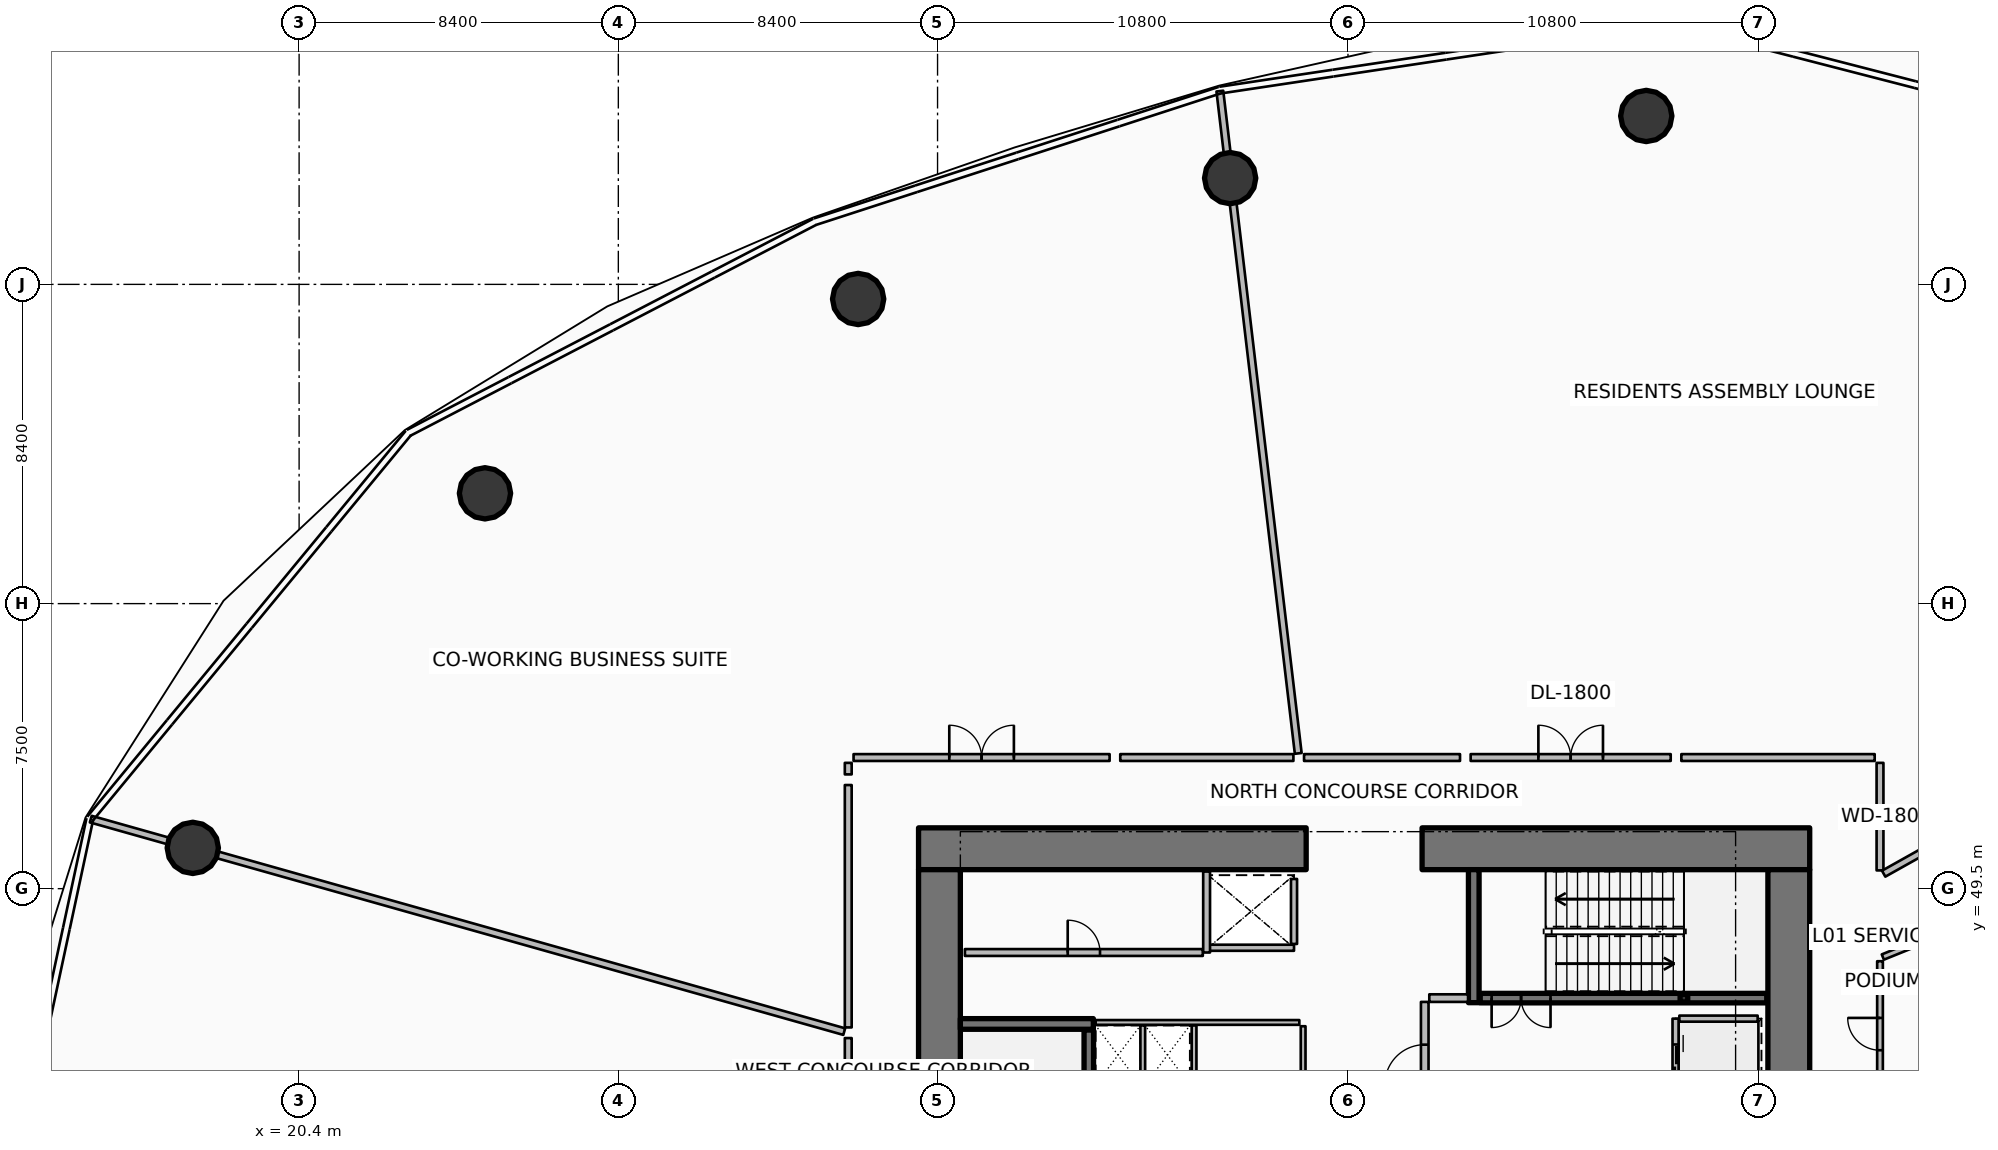
"""IFC4 building model, lengths in metres.
Left out: names, types, materials, properties, quantities, classifications, styles, units other than length and angle.
Written with IfcOpenShell. Run it as: python <this file> out.ifc"""

import sys

from ifc_helpers import new_model, si_unit, direction, frame, frame_2d, origin, origin_2d, place, context, subcontext, project, spatial, rectangle, hollow_rectangle, circle, extrude, element, fill, save


model = new_model("IFC4")
c1 = context("Model", 3, precision=1e-05, world=origin(), true_north=direction((0.0, 1.0)))
c2 = subcontext(c1, "Body", "Model", "MODEL_VIEW")
j1 = project(units=[si_unit("LENGTHUNIT", "METRE"), si_unit("PLANEANGLEUNIT", "RADIAN")], contexts=[c1])
p1 = place(None, origin())
s1 = spatial("IfcSite", under=j1, at=p1, CompositionType="ELEMENT")
p2 = place(p1, origin())
s2 = spatial("IfcBuilding", under=s1, at=p2, CompositionType="ELEMENT")
p3 = place(p2, frame((0.0, 0.0, 7.2)))
s3 = spatial("IfcBuildingStorey", under=s2, at=p3, CompositionType="ELEMENT", Elevation=7.2)
for number, where, z_axis, x_axis in (
    (1, (36.7, 50.55, 0.0), (0.0, 0.0, 1.0), (1.0, 0.0, 0.0)),
    (2, (49.95, 50.55, 0.0), (0.0, 0.0, 1.0), (1.0, 0.0, 0.0)),
):
    element("IfcWall", number, at=place(p3, frame(where, z_axis=z_axis, x_axis=x_axis)), inside=s3, PredefinedType="SHEAR", context=c2, shape_type="SweptSolid", body=[
        extrude(rectangle(XDim=10.2, YDim=1.1, at=frame_2d((5.1, 0.0))), origin(), (0.0, 0.0, 1.0), 4.8),
    ])
for number, where, z_axis, x_axis in (
    (3, (37.25, 34.0, 0.0), (0.0, 0.0, 1.0), (0.0, 1.0, 0.0)),
    (4, (59.6, 34.0, 0.0), (0.0, 0.0, 1.0), (0.0, 1.0, 0.0)),
):
    element("IfcWall", number, at=place(p3, frame(where, z_axis=z_axis, x_axis=x_axis)), inside=s3, PredefinedType="SHEAR", context=c2, shape_type="SweptSolid", body=[
        extrude(rectangle(XDim=16.0, YDim=1.1, at=frame_2d((8.0, 0.0))), origin(), (0.0, 0.0, 1.0), 4.8),
    ])
for number, where, z_axis, x_axis in (
    (5, (37.8, 45.94, 0.0), (0.0, 0.0, 1.0), (1.0, 0.0, 0.0)),
    (6, (51.31, 46.5, 0.0), (0.0, 0.0, 1.0), (0.0, 1.0, 0.0)),
):
    element("IfcWall", number, at=place(p3, frame(where, z_axis=z_axis, x_axis=x_axis)), inside=s3, PredefinedType="SHEAR", context=c2, shape_type="SweptSolid", body=[
        extrude(rectangle(XDim=3.5, YDim=0.28, at=frame_2d((1.75, 0.0))), origin(), (0.0, 0.0, 1.0), 4.8),
    ])
p4 = place(p3, frame((56.84, 46.62, 0.0), z_axis=(0.0, 0.0, 1.0), x_axis=(1.0, 0.0, 0.0)))
e7 = element("IfcColumn", 7, at=p4, inside=s3, PredefinedType="COLUMN", context=c2, shape_type="SweptSolid", body=[
    extrude(hollow_rectangle(XDim=0.2, YDim=0.2, WallThickness=0.01, InnerFilletRadius=0.01, OuterFilletRadius=0.02, at=origin_2d()), origin(), (0.0, 0.0, 1.0), 2.195),
])
for number, where, z_axis, x_axis in (
    (8, (55.849, 69.831, 0.0), (0.0, 0.0, 1.0), (1.0, 0.0, 0.0)),
    (9, (44.899, 68.196, 0.0), (0.0, 0.0, 1.0), (1.0, 0.0, 0.0)),
    (10, (35.111, 65.016, 0.0), (0.0, 0.0, 1.0), (1.0, 0.0, 0.0)),
    (11, (25.291, 59.902, 0.0), (0.0, 0.0, 1.0), (1.0, 0.0, 0.0)),
    (12, (17.602, 50.573, 0.0), (0.0, 0.0, 1.0), (1.0, 0.0, 0.0)),
):
    element("IfcColumn", number, at=place(p3, frame(where, z_axis=z_axis, x_axis=x_axis)), inside=s3, PredefinedType="COLUMN", context=c2, shape_type="SweptSolid", body=[
        extrude(circle(Radius=0.675, at=origin_2d()), origin(), (0.0, 0.0, 1.0), 4.48),
    ])
p5 = place(p3, frame((41.18, 38.22, 0.0), z_axis=(0.0, 0.0, 1.0), x_axis=(0.0, 1.0, 0.0)))
e13 = element("IfcWall", 13, at=p5, inside=s3, PredefinedType="SOLIDWALL", context=c2, shape_type="SweptSolid", body=[
    extrude(rectangle(XDim=7.56, YDim=0.25, at=frame_2d((3.78, 0.0))), origin(), (0.0, 0.0, 1.0), 4.48),
])
p6 = place(p5, frame((0.3, 0.0, 0.0)))
e14 = element("IfcOpeningElement", 14, at=p6, cuts=e13, PredefinedType="OPENING", context=c2, shape_type="SweptSolid", body=[
    extrude(rectangle(XDim=1.55, YDim=2.15, at=frame_2d((0.775, 1.075))), frame((0.0, 0.135, 0.0), z_axis=(0.0, -1.0, 0.0), x_axis=(1.0, 0.0, 0.0)), (0.0, 0.0, 1.0), 0.27),
])
p7 = place(p3, frame((51.48, 46.62, 0.0), z_axis=(0.0, 0.0, 1.0), x_axis=(1.0, 0.0, 0.0)))
e15 = element("IfcWall", 15, at=p7, inside=s3, PredefinedType="SOLIDWALL", context=c2, shape_type="SweptSolid", body=[
    extrude(rectangle(XDim=7.54, YDim=0.25, at=frame_2d((3.77, 0.0))), origin(), (0.0, 0.0, 1.0), 4.48),
])
p8 = place(p7, frame((0.3, 0.0, 0.0)))
e16 = element("IfcOpeningElement", 16, at=p8, cuts=e15, PredefinedType="OPENING", context=c2, shape_type="SweptSolid", body=[
    extrude(rectangle(XDim=1.55, YDim=2.15, at=frame_2d((0.775, 1.075))), frame((0.0, 0.135, 0.0), z_axis=(0.0, -1.0, 0.0), x_axis=(1.0, 0.0, 0.0)), (0.0, 0.0, 1.0), 0.27),
])
p9 = place(p3, frame((46.58, 47.945, 0.0), z_axis=(0.0, 0.0, 1.0), x_axis=(-1.0, 0.0, 0.0)))
e17 = element("IfcWall", 17, at=p9, inside=s3, PredefinedType="PARTITIONING", context=c2, shape_type="SweptSolid", body=[
    extrude(rectangle(XDim=2.26, YDim=0.16, at=frame_2d((1.13, 0.0))), origin(), (0.0, 0.0, 1.0), 4.48),
])
p10 = place(p3, frame((46.58, 48.045, 0.0), z_axis=(0.0, 0.0, 1.0), x_axis=(0.0, 1.0, 0.0)))
e18 = element("IfcWall", 18, at=p10, inside=s3, PredefinedType="PARTITIONING", context=c2, shape_type="SweptSolid", body=[
    extrude(rectangle(XDim=1.71, YDim=0.16, at=frame_2d((0.855, 0.0))), origin(), (0.0, 0.0, 1.0), 4.48),
])
p11 = place(p3, frame((56.62, 46.08, 0.0), z_axis=(0.0, 0.0, 1.0), x_axis=(0.0, -1.0, 0.0)))
e19 = element("IfcWall", 19, at=p11, inside=s3, PredefinedType="PARTITIONING", context=c2, shape_type="SweptSolid", body=[
    extrude(rectangle(XDim=2.46, YDim=0.16, at=frame_2d((1.23, 0.0))), origin(), (0.0, 0.0, 1.0), 4.48),
])
p12 = place(p11, frame((0.68, 0.0, 0.0)))
e20 = element("IfcOpeningElement", 20, at=p12, cuts=e19, PredefinedType="OPENING", context=c2, shape_type="SweptSolid", body=[
    extrude(rectangle(XDim=1.1, YDim=2.1, at=frame_2d((0.55, 1.05))), frame((0.0, 0.09, 0.0), z_axis=(0.0, -1.0, 0.0), x_axis=(1.0, 0.0, 0.0)), (0.0, 0.0, 1.0), 0.18),
])
p13 = place(p3, frame((56.72, 46.08, 0.0), z_axis=(0.0, 0.0, 1.0), x_axis=(1.0, 0.0, 0.0)))
e21 = element("IfcWall", 21, at=p13, inside=s3, PredefinedType="PARTITIONING", context=c2, shape_type="SweptSolid", body=[
    extrude(rectangle(XDim=2.06, YDim=0.16, at=frame_2d((1.03, 0.0))), origin(), (0.0, 0.0, 1.0), 4.48),
])
p14 = place(p3, frame((37.92, 47.82, 0.0), z_axis=(0.0, 0.0, 1.0), x_axis=(1.0, 0.0, 0.0)))
e22 = element("IfcWall", 22, at=p14, inside=s3, PredefinedType="PARTITIONING", context=c2, shape_type="SweptSolid", body=[
    extrude(rectangle(XDim=6.26, YDim=0.18, at=frame_2d((3.13, 0.0))), origin(), (0.0, 0.0, 1.0), 4.48),
])
p15 = place(p14, frame((2.705, 0.0, 0.0)))
e23 = element("IfcOpeningElement", 23, at=p15, cuts=e22, PredefinedType="OPENING", context=c2, shape_type="SweptSolid", body=[
    extrude(rectangle(XDim=0.85, YDim=2.06, at=frame_2d((0.425, 1.03))), frame((0.0, 0.1, 0.0), z_axis=(0.0, -1.0, 0.0), x_axis=(1.0, 0.0, 0.0)), (0.0, 0.0, 1.0), 0.2),
])
p16 = place(p3, frame((44.28, 47.82, 0.0), z_axis=(0.0, 0.0, 1.0), x_axis=(0.0, 1.0, 0.0)))
e24 = element("IfcWall", 24, at=p16, inside=s3, PredefinedType="PARTITIONING", context=c2, shape_type="SweptSolid", body=[
    extrude(rectangle(XDim=2.13, YDim=0.18, at=frame_2d((1.065, 0.0))), origin(), (0.0, 0.0, 1.0), 4.48),
])
p17 = place(p3, frame((50.14, 46.62, 0.0), z_axis=(0.0, 0.0, 1.0), x_axis=(1.0, 0.0, 0.0)))
e25 = element("IfcWall", 25, at=p17, inside=s3, PredefinedType="PARTITIONING", context=c2, shape_type="SweptSolid", body=[
    extrude(rectangle(XDim=1.02, YDim=0.2, at=frame_2d((0.51, 0.0))), origin(), (0.0, 0.0, 1.0), 4.48),
])
p18 = place(p3, frame((50.02, 43.22, 0.0), z_axis=(0.0, 0.0, 1.0), x_axis=(0.0, 1.0, 0.0)))
e26 = element("IfcWall", 26, at=p18, inside=s3, PredefinedType="PARTITIONING", context=c2, shape_type="SweptSolid", body=[
    extrude(rectangle(XDim=3.3, YDim=0.2, at=frame_2d((1.65, 0.0))), origin(), (0.0, 0.0, 1.0), 4.48),
])
p19 = place(p18, frame((1.125, 0.0, 0.0)))
e27 = element("IfcOpeningElement", 27, at=p19, cuts=e26, PredefinedType="OPENING", context=c2, shape_type="SweptSolid", body=[
    extrude(rectangle(XDim=1.05, YDim=2.1, at=frame_2d((0.525, 1.05))), frame((0.0, 0.11, 0.0), z_axis=(0.0, -1.0, 0.0), x_axis=(1.0, 0.0, 0.0)), (0.0, 0.0, 1.0), 0.22),
])
p20 = place(p3, frame((41.36, 45.98, 0.0), z_axis=(0.0, 0.0, 1.0), x_axis=(1.0, 0.0, 0.0)))
e28 = element("IfcWall", 28, at=p20, inside=s3, PredefinedType="PARTITIONING", context=c2, shape_type="SweptSolid", body=[
    extrude(rectangle(XDim=5.36, YDim=0.125, at=frame_2d((2.68, 0.0))), origin(), (0.0, 0.0, 1.0), 3.92),
])
p21 = place(p3, frame((42.6, 44.35, 0.0), z_axis=(0.0, 0.0, 1.0), x_axis=(0.0, 1.0, 0.0)))
e29 = element("IfcWall", 29, at=p21, inside=s3, PredefinedType="PARTITIONING", context=c2, shape_type="SweptSolid", body=[
    extrude(rectangle(XDim=1.55, YDim=0.125, at=frame_2d((0.775, 0.0))), origin(), (0.0, 0.0, 1.0), 3.92),
])
p22 = place(p3, frame((43.95, 41.58, 0.0), z_axis=(0.0, 0.0, 1.0), x_axis=(0.0, 1.0, 0.0)))
e30 = element("IfcWall", 30, at=p22, inside=s3, PredefinedType="PARTITIONING", context=c2, shape_type="SweptSolid", body=[
    extrude(rectangle(XDim=4.32, YDim=0.125, at=frame_2d((2.16, 0.0))), origin(), (0.0, 0.0, 1.0), 3.92),
])
p23 = place(p3, frame((46.82, 41.58, 0.0), z_axis=(0.0, 0.0, 1.0), x_axis=(0.0, 1.0, 0.0)))
e31 = element("IfcWall", 31, at=p23, inside=s3, PredefinedType="PARTITIONING", context=c2, shape_type="SweptSolid", body=[
    extrude(rectangle(XDim=4.3, YDim=0.125, at=frame_2d((2.15, 0.0))), origin(), (0.0, 0.0, 1.0), 3.92),
])
p24 = place(p23, frame((1.725, 0.0, 0.0)))
e32 = element("IfcOpeningElement", 32, at=p24, cuts=e31, PredefinedType="OPENING", context=c2, shape_type="SweptSolid", body=[
    extrude(rectangle(XDim=0.85, YDim=2.06, at=frame_2d((0.425, 1.03))), frame((0.0, 0.073, 0.0), z_axis=(0.0, -1.0, 0.0), x_axis=(1.0, 0.0, 0.0)), (0.0, 0.0, 1.0), 0.145),
])
p25 = place(p3, frame((62.0, 49.98, 0.0), z_axis=(0.0, 0.0, 1.0), x_axis=(0.0, 1.0, 0.0)))
e33 = element("IfcWall", 33, at=p25, inside=s3, PredefinedType="PARTITIONING", context=c2, shape_type="SweptSolid", body=[
    extrude(rectangle(XDim=2.83, YDim=0.18, at=frame_2d((1.415, 0.0))), origin(), (0.0, 0.0, 1.0), 3.693),
])
p26 = place(p3, frame((61.86, 52.95, 0.0), z_axis=(0.0, 0.0, 1.0), x_axis=(-1.0, 0.0, 0.0)))
e34 = element("IfcWall", 34, at=p26, inside=s3, PredefinedType="PARTITIONING", context=c2, shape_type="SweptSolid", body=[
    extrude(rectangle(XDim=5.088, YDim=0.18, at=frame_2d((2.544, 0.0))), origin(), (0.0, 0.0, 1.0), 3.693),
])
p27 = place(p3, frame((56.492, 52.95, 0.0), z_axis=(0.0, 0.0, 1.0), x_axis=(-1.0, 0.0, 0.0)))
e35 = element("IfcWall", 35, at=p27, inside=s3, PredefinedType="PARTITIONING", context=c2, shape_type="SweptSolid", body=[
    extrude(rectangle(XDim=5.264, YDim=0.18, at=frame_2d((2.632, 0.0))), origin(), (0.0, 0.0, 1.0), 3.693),
])
p28 = place(p27, frame((1.782, 0.0, 0.0)))
e36 = element("IfcOpeningElement", 36, at=p28, cuts=e35, PredefinedType="OPENING", context=c2, shape_type="SweptSolid", body=[
    extrude(rectangle(XDim=1.7, YDim=2.15, at=frame_2d((0.85, 1.075))), frame((0.0, 0.1, 0.0), z_axis=(0.0, -1.0, 0.0), x_axis=(1.0, 0.0, 0.0)), (0.0, 0.0, 1.0), 0.2),
])
p29 = place(p3, frame((50.948, 52.95, 0.0), z_axis=(0.0, 0.0, 1.0), x_axis=(-1.0, 0.0, 0.0)))
e37 = element("IfcWall", 37, at=p29, inside=s3, PredefinedType="PARTITIONING", context=c2, shape_type="SweptSolid", body=[
    extrude(rectangle(XDim=4.104, YDim=0.18, at=frame_2d((2.052, 0.0))), origin(), (0.0, 0.0, 1.0), 3.693),
])
p30 = place(p3, frame((62.096, 49.894, 0.0), z_axis=(0.0, 0.0, 1.0), x_axis=(0.872490608205, 0.488630881744, 0.0)))
e38 = element("IfcWall", 38, at=p30, inside=s3, PredefinedType="PARTITIONING", context=c2, shape_type="SweptSolid", body=[
    extrude(rectangle(XDim=19.185, YDim=0.18, at=frame_2d((9.592, 0.0))), origin(), (0.0, 0.0, 1.0), 3.693),
])
p31 = place(p3, frame((46.691, 53.059, 0.0), z_axis=(0.0, 0.0, 1.0), x_axis=(-0.117547531601, 0.993067257448, 0.0)))
e39 = element("IfcWall", 39, at=p31, inside=s3, PredefinedType="PARTITIONING", context=c2, shape_type="SweptSolid", body=[
    extrude(rectangle(XDim=17.548, YDim=0.18, at=frame_2d((8.774, 0.0))), origin(), (0.0, 0.0, 1.0), 3.693),
])
p32 = place(p3, frame((46.564, 52.95, 0.0), z_axis=(0.0, 0.0, 1.0), x_axis=(-1.0, 0.0, 0.0)))
e40 = element("IfcWall", 40, at=p32, inside=s3, PredefinedType="PARTITIONING", context=c2, shape_type="SweptSolid", body=[
    extrude(rectangle(XDim=4.556, YDim=0.18, at=frame_2d((2.278, 0.0))), origin(), (0.0, 0.0, 1.0), 3.693),
])
p33 = place(p3, frame((41.728, 52.95, 0.0), z_axis=(0.0, 0.0, 1.0), x_axis=(-1.0, 0.0, 0.0)))
e41 = element("IfcWall", 41, at=p33, inside=s3, PredefinedType="PARTITIONING", context=c2, shape_type="SweptSolid", body=[
    extrude(rectangle(XDim=6.738, YDim=0.18, at=frame_2d((3.369, 0.0))), origin(), (0.0, 0.0, 1.0), 3.693),
])
p34 = place(p33, frame((2.519, 0.0, 0.0)))
e42 = element("IfcOpeningElement", 42, at=p34, cuts=e41, PredefinedType="OPENING", context=c2, shape_type="SweptSolid", body=[
    extrude(rectangle(XDim=1.7, YDim=2.15, at=frame_2d((0.85, 1.075))), frame((0.0, 0.1, 0.0), z_axis=(0.0, -1.0, 0.0), x_axis=(1.0, 0.0, 0.0)), (0.0, 0.0, 1.0), 0.2),
])
p35 = place(p3, frame((34.85, 52.81, 0.0), z_axis=(0.0, 0.0, 1.0), x_axis=(0.0, -1.0, 0.0)))
e43 = element("IfcWall", 43, at=p35, inside=s3, PredefinedType="PARTITIONING", context=c2, shape_type="SweptSolid", body=[
    extrude(rectangle(XDim=0.303, YDim=0.18, at=frame_2d((0.152, 0.0))), origin(), (0.0, 0.0, 1.0), 3.693),
])
p36 = place(p3, frame((34.85, 52.227, 0.0), z_axis=(0.0, 0.0, 1.0), x_axis=(0.0, -1.0, 0.0)))
e44 = element("IfcWall", 44, at=p36, inside=s3, PredefinedType="PARTITIONING", context=c2, shape_type="SweptSolid", body=[
    extrude(rectangle(XDim=6.378, YDim=0.18, at=frame_2d((3.189, 0.0))), origin(), (0.0, 0.0, 1.0), 3.693),
])
p37 = place(p3, frame((34.744, 45.739, 0.0), z_axis=(0.0, 0.0, 1.0), x_axis=(-0.96245531293, 0.271440178702, 0.0)))
e45 = element("IfcWall", 45, at=p37, inside=s3, PredefinedType="PARTITIONING", context=c2, shape_type="SweptSolid", body=[
    extrude(rectangle(XDim=20.6, YDim=0.18, at=frame_2d((10.3, 0.0))), origin(), (0.0, 0.0, 1.0), 3.693),
])
p38 = place(p3, frame((34.85, 45.569, 0.0), z_axis=(0.0, 0.0, 1.0), x_axis=(0.0, -1.0, 0.0)))
e46 = element("IfcWall", 46, at=p38, inside=s3, PredefinedType="PARTITIONING", context=c2, shape_type="SweptSolid", body=[
    extrude(rectangle(XDim=4.985, YDim=0.18, at=frame_2d((2.493, 0.0))), origin(), (0.0, 0.0, 1.0), 3.693),
])
p39 = place(p3, frame((62.109, 43.67, 0.0), z_axis=(0.0, 0.0, 1.0), x_axis=(0.993068665713, 0.117535633659, 0.0)))
e47 = element("IfcWall", 47, at=p39, inside=s3, PredefinedType="PARTITIONING", context=c2, shape_type="SweptSolid", body=[
    extrude(rectangle(XDim=21.133, YDim=0.18, at=frame_2d((10.566, 0.0))), origin(), (0.0, 0.0, 1.0), 3.693),
])
p40 = place(p3, frame((62.0, 43.757, 0.0), z_axis=(0.0, 0.0, 1.0), x_axis=(0.0, 1.0, 0.0)))
e48 = element("IfcWall", 48, at=p40, inside=s3, PredefinedType="PARTITIONING", context=c2, shape_type="SweptSolid", body=[
    extrude(rectangle(XDim=3.833, YDim=0.15, at=frame_2d((1.917, 0.0))), origin(), (0.0, 0.0, 1.0), 3.693),
])
p41 = place(p40, frame((1.492, 0.0, 0.0)))
e49 = element("IfcOpeningElement", 49, at=p41, cuts=e48, PredefinedType="OPENING", context=c2, shape_type="SweptSolid", body=[
    extrude(rectangle(XDim=0.85, YDim=2.06, at=frame_2d((0.425, 1.03))), frame((0.0, 0.085, 0.0), z_axis=(0.0, -1.0, 0.0), x_axis=(1.0, 0.0, 0.0)), (0.0, 0.0, 1.0), 0.17),
])
p42 = place(p3, frame((62.074, 47.701, 0.0), z_axis=(0.0, 0.0, 1.0), x_axis=(0.926852538468, 0.375425587747, 0.0)))
e50 = element("IfcWall", 50, at=p42, inside=s3, PredefinedType="PARTITIONING", context=c2, shape_type="SweptSolid", body=[
    extrude(rectangle(XDim=2.96, YDim=0.15, at=frame_2d((1.48, 0.0))), origin(), (0.0, 0.0, 1.0), 3.92),
])
p43 = place(p8, origin())
e51 = element("IfcDoor", 51, at=p43, inside=s3, OperationType="DOUBLE_DOOR_SINGLE_SWING", PredefinedType="DOOR", context=c2, shape_type="SweptSolid", body=[
    extrude(rectangle(XDim=1.55, YDim=2.15, at=frame_2d((0.775, 1.075))), frame((0.0, 0.025, 0.0), z_axis=(0.0, -1.0, 0.0), x_axis=(1.0, 0.0, 0.0)), (0.0, 0.0, 1.0), 0.05),
])
fill(e16, e51)
p44 = place(p12, origin())
e52 = element("IfcDoor", 52, at=p44, inside=s3, OperationType="DOUBLE_DOOR_SLIDING", PredefinedType="DOOR", context=c2, shape_type="SweptSolid", body=[
    extrude(rectangle(XDim=1.1, YDim=2.1, at=frame_2d((0.55, 1.05))), frame((0.0, 0.025, 0.0), z_axis=(0.0, -1.0, 0.0), x_axis=(1.0, 0.0, 0.0)), (0.0, 0.0, 1.0), 0.05),
])
fill(e20, e52)
p45 = place(p15, origin())
e53 = element("IfcDoor", 53, at=p45, inside=s3, OperationType="SINGLE_SWING_LEFT", PredefinedType="DOOR", context=c2, shape_type="SweptSolid", body=[
    extrude(rectangle(XDim=0.85, YDim=2.06, at=frame_2d((0.425, 1.03))), frame((0.0, 0.025, 0.0), z_axis=(0.0, -1.0, 0.0), x_axis=(1.0, 0.0, 0.0)), (0.0, 0.0, 1.0), 0.05),
])
fill(e23, e53)
p46 = place(p19, origin())
e54 = element("IfcDoor", 54, at=p46, inside=s3, OperationType="SINGLE_SWING_LEFT", PredefinedType="DOOR", context=c2, shape_type="SweptSolid", body=[
    extrude(rectangle(XDim=1.05, YDim=2.1, at=frame_2d((0.525, 1.05))), frame((0.0, 0.025, 0.0), z_axis=(0.0, -1.0, 0.0), x_axis=(1.0, 0.0, 0.0)), (0.0, 0.0, 1.0), 0.05),
])
fill(e27, e54)
p47 = place(p28, origin())
e55 = element("IfcDoor", 55, at=p47, inside=s3, OperationType="DOUBLE_DOOR_SINGLE_SWING", PredefinedType="DOOR", context=c2, shape_type="SweptSolid", body=[
    extrude(rectangle(XDim=1.7, YDim=2.15, at=frame_2d((0.85, 1.075))), frame((0.0, 0.025, 0.0), z_axis=(0.0, -1.0, 0.0), x_axis=(1.0, 0.0, 0.0)), (0.0, 0.0, 1.0), 0.05),
])
fill(e36, e55)
p48 = place(p34, origin())
e56 = element("IfcDoor", 56, at=p48, inside=s3, OperationType="DOUBLE_DOOR_SINGLE_SWING", PredefinedType="DOOR", context=c2, shape_type="SweptSolid", body=[
    extrude(rectangle(XDim=1.7, YDim=2.15, at=frame_2d((0.85, 1.075))), frame((0.0, 0.025, 0.0), z_axis=(0.0, -1.0, 0.0), x_axis=(1.0, 0.0, 0.0)), (0.0, 0.0, 1.0), 0.05),
])
fill(e42, e56)
p49 = place(p41, origin())
e57 = element("IfcDoor", 57, at=p49, inside=s3, OperationType="SINGLE_SWING_RIGHT", PredefinedType="DOOR", context=c2, shape_type="SweptSolid", body=[
    extrude(rectangle(XDim=0.85, YDim=2.06, at=frame_2d((0.425, 1.03))), frame((0.0, 0.025, 0.0), z_axis=(0.0, -1.0, 0.0), x_axis=(1.0, 0.0, 0.0)), (0.0, 0.0, 1.0), 0.05),
])
fill(e49, e57)
save(model, sys.argv[1])
